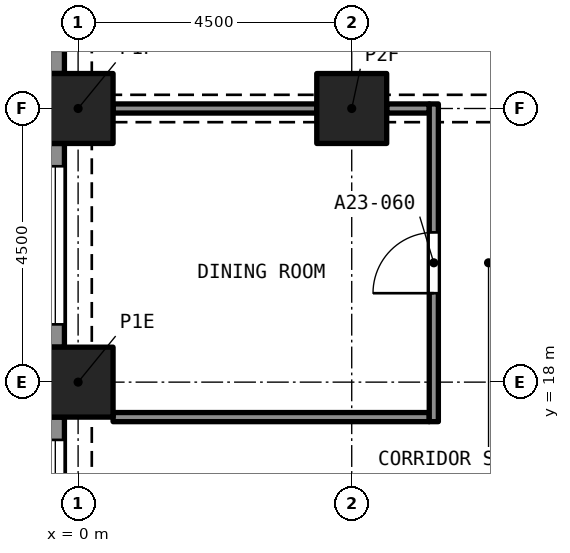
"""IFC4 building model, lengths in metres.
Left out: names, types, materials, properties, quantities, classifications, styles, units other than length and angle.
Written with IfcOpenShell. Run it as: python <this file> out.ifc"""

import sys

from ifc_helpers import new_model, si_unit, direction, frame, frame_2d, origin, origin_2d, place, context, subcontext, project, spatial, rectangle, extrude, element, fill, save


model = new_model("IFC4")
c1 = context("Model", 3, precision=1e-05, world=origin(), true_north=direction((0.0, 1.0)))
c2 = subcontext(c1, "Body", "Model", "MODEL_VIEW")
j1 = project(units=[si_unit("LENGTHUNIT", "METRE"), si_unit("PLANEANGLEUNIT", "RADIAN")], contexts=[c1])
p1 = place(None, origin())
s1 = spatial("IfcSite", under=j1, at=p1, CompositionType="ELEMENT")
p2 = place(p1, origin())
s2 = spatial("IfcBuilding", under=s1, at=p2, CompositionType="ELEMENT")
p3 = place(p2, frame((0.0, 0.0, 86.4)))
s3 = spatial("IfcBuildingStorey", under=s2, at=p3, CompositionType="ELEMENT", Elevation=86.4)
for number, where, z_axis, x_axis in (
    (1, (0.0, 18.0, 0.0), (0.0, 0.0, 1.0), (1.0, 0.0, 0.0)),
    (2, (0.0, 22.5, 0.0), (0.0, 0.0, 1.0), (1.0, 0.0, 0.0)),
    (3, (4.5, 22.5, 0.0), (0.0, 0.0, 1.0), (1.0, 0.0, 0.0)),
):
    element("IfcColumn", number, at=place(p3, frame(where, z_axis=z_axis, x_axis=x_axis)), inside=s3, PredefinedType="COLUMN", context=c2, shape_type="SweptSolid", body=[
        extrude(rectangle(XDim=1.15, YDim=1.15, at=origin_2d()), origin(), (0.0, 0.0, 1.0), 3.2),
    ])
p4 = place(p3, frame((-0.375, 23.075, 0.0), z_axis=(0.0, 0.0, 1.0), x_axis=(0.0, 1.0, 0.0)))
e4 = element("IfcWall", 4, at=p4, inside=s3, PredefinedType="SOLIDWALL", context=c2, shape_type="SweptSolid", body=[
    extrude(rectangle(XDim=3.35, YDim=0.3, at=frame_2d((1.675, 0.0))), origin(), (0.0, 0.0, 1.0), 3.2),
])
p5 = place(p4, frame((0.375, 0.0, 0.45)))
e5 = element("IfcOpeningElement", 5, at=p5, cuts=e4, PredefinedType="OPENING", context=c2, shape_type="SweptSolid", body=[
    extrude(rectangle(XDim=2.6, YDim=1.95, at=frame_2d((1.3, 0.975))), frame((0.0, 0.16, 0.0), z_axis=(0.0, -1.0, 0.0), x_axis=(1.0, 0.0, 0.0)), (0.0, 0.0, 1.0), 0.32),
])
p6 = place(p3, frame((-0.375, 18.575, 0.0), z_axis=(0.0, 0.0, 1.0), x_axis=(0.0, 1.0, 0.0)))
e6 = element("IfcWall", 6, at=p6, inside=s3, PredefinedType="SOLIDWALL", context=c2, shape_type="SweptSolid", body=[
    extrude(rectangle(XDim=3.35, YDim=0.3, at=frame_2d((1.675, 0.0))), origin(), (0.0, 0.0, 1.0), 3.2),
])
p7 = place(p6, frame((0.375, 0.0, 0.45)))
e7 = element("IfcOpeningElement", 7, at=p7, cuts=e6, PredefinedType="OPENING", context=c2, shape_type="SweptSolid", body=[
    extrude(rectangle(XDim=2.6, YDim=1.95, at=frame_2d((1.3, 0.975))), frame((0.0, 0.16, 0.0), z_axis=(0.0, -1.0, 0.0), x_axis=(1.0, 0.0, 0.0)), (0.0, 0.0, 1.0), 0.32),
])
p8 = place(p3, frame((-0.375, 14.075, 0.0), z_axis=(0.0, 0.0, 1.0), x_axis=(0.0, 1.0, 0.0)))
e8 = element("IfcWall", 8, at=p8, inside=s3, PredefinedType="SOLIDWALL", context=c2, shape_type="SweptSolid", body=[
    extrude(rectangle(XDim=3.35, YDim=0.3, at=frame_2d((1.675, 0.0))), origin(), (0.0, 0.0, 1.0), 3.2),
])
p9 = place(p8, frame((0.375, 0.0, 0.45)))
e9 = element("IfcOpeningElement", 9, at=p9, cuts=e8, PredefinedType="OPENING", context=c2, shape_type="SweptSolid", body=[
    extrude(rectangle(XDim=2.6, YDim=1.95, at=frame_2d((1.3, 0.975))), frame((0.0, 0.16, 0.0), z_axis=(0.0, -1.0, 0.0), x_axis=(1.0, 0.0, 0.0)), (0.0, 0.0, 1.0), 0.32),
])
p10 = place(p3, frame((0.575, 17.425, 0.0), z_axis=(0.0, 0.0, 1.0), x_axis=(1.0, 0.0, 0.0)))
e10 = element("IfcWall", 10, at=p10, inside=s3, PredefinedType="PARTITIONING", context=c2, shape_type="SweptSolid", body=[
    extrude(rectangle(XDim=5.2, YDim=0.15, at=frame_2d((2.6, 0.0))), origin(), (0.0, 0.0, 1.0), 2.9),
])
p11 = place(p3, frame((5.075, 22.5, 0.0), z_axis=(0.0, 0.0, 1.0), x_axis=(1.0, 0.0, 0.0)))
e11 = element("IfcWall", 11, at=p11, inside=s3, PredefinedType="PARTITIONING", context=c2, shape_type="SweptSolid", body=[
    extrude(rectangle(XDim=0.7, YDim=0.15, at=frame_2d((0.35, 0.0))), origin(), (0.0, 0.0, 1.0), 2.38),
])
p12 = place(p3, frame((0.575, 22.5, 0.0), z_axis=(0.0, 0.0, 1.0), x_axis=(1.0, 0.0, 0.0)))
e12 = element("IfcWall", 12, at=p12, inside=s3, PredefinedType="PARTITIONING", context=c2, shape_type="SweptSolid", body=[
    extrude(rectangle(XDim=3.35, YDim=0.15, at=frame_2d((1.675, 0.0))), origin(), (0.0, 0.0, 1.0), 2.38),
])
p13 = place(p3, frame((5.85, 17.35, 0.0), z_axis=(0.0, 0.0, 1.0), x_axis=(0.0, 1.0, 0.0)))
e13 = element("IfcWall", 13, at=p13, inside=s3, PredefinedType="PARTITIONING", context=c2, shape_type="SweptSolid", body=[
    extrude(rectangle(XDim=5.225, YDim=0.15, at=frame_2d((2.612, 0.0))), origin(), (0.0, 0.0, 1.0), 2.9),
])
p14 = place(p13, frame((2.113, 0.0, 0.0)))
e14 = element("IfcOpeningElement", 14, at=p14, cuts=e13, PredefinedType="OPENING", context=c2, shape_type="SweptSolid", body=[
    extrude(rectangle(XDim=1.0, YDim=2.1, at=frame_2d((0.5, 1.05))), frame((0.0, 0.085, 0.0), z_axis=(0.0, -1.0, 0.0), x_axis=(1.0, 0.0, 0.0)), (0.0, 0.0, 1.0), 0.17),
])
p15 = place(p7, origin())
e15 = element("IfcWindow", 15, at=p15, inside=s3, PartitioningType="SINGLE_PANEL", PredefinedType="WINDOW", context=c2, shape_type="SweptSolid", body=[
    extrude(rectangle(XDim=2.6, YDim=1.95, at=frame_2d((1.3, 0.975))), frame((0.0, 0.03, 0.0), z_axis=(0.0, -1.0, 0.0), x_axis=(1.0, 0.0, 0.0)), (0.0, 0.0, 1.0), 0.06),
])
fill(e7, e15)
p16 = place(p9, origin())
e16 = element("IfcWindow", 16, at=p16, inside=s3, PartitioningType="SINGLE_PANEL", PredefinedType="WINDOW", context=c2, shape_type="SweptSolid", body=[
    extrude(rectangle(XDim=2.6, YDim=1.95, at=frame_2d((1.3, 0.975))), frame((0.0, 0.03, 0.0), z_axis=(0.0, -1.0, 0.0), x_axis=(1.0, 0.0, 0.0)), (0.0, 0.0, 1.0), 0.06),
])
fill(e9, e16)
p17 = place(p14, origin())
e17 = element("IfcDoor", 17, at=p17, inside=s3, OperationType="SINGLE_SWING_LEFT", PredefinedType="DOOR", context=c2, shape_type="SweptSolid", body=[
    extrude(rectangle(XDim=1.0, YDim=2.1, at=frame_2d((0.5, 1.05))), frame((0.0, 0.025, 0.0), z_axis=(0.0, -1.0, 0.0), x_axis=(1.0, 0.0, 0.0)), (0.0, 0.0, 1.0), 0.05),
])
fill(e14, e17)
save(model, sys.argv[1])
